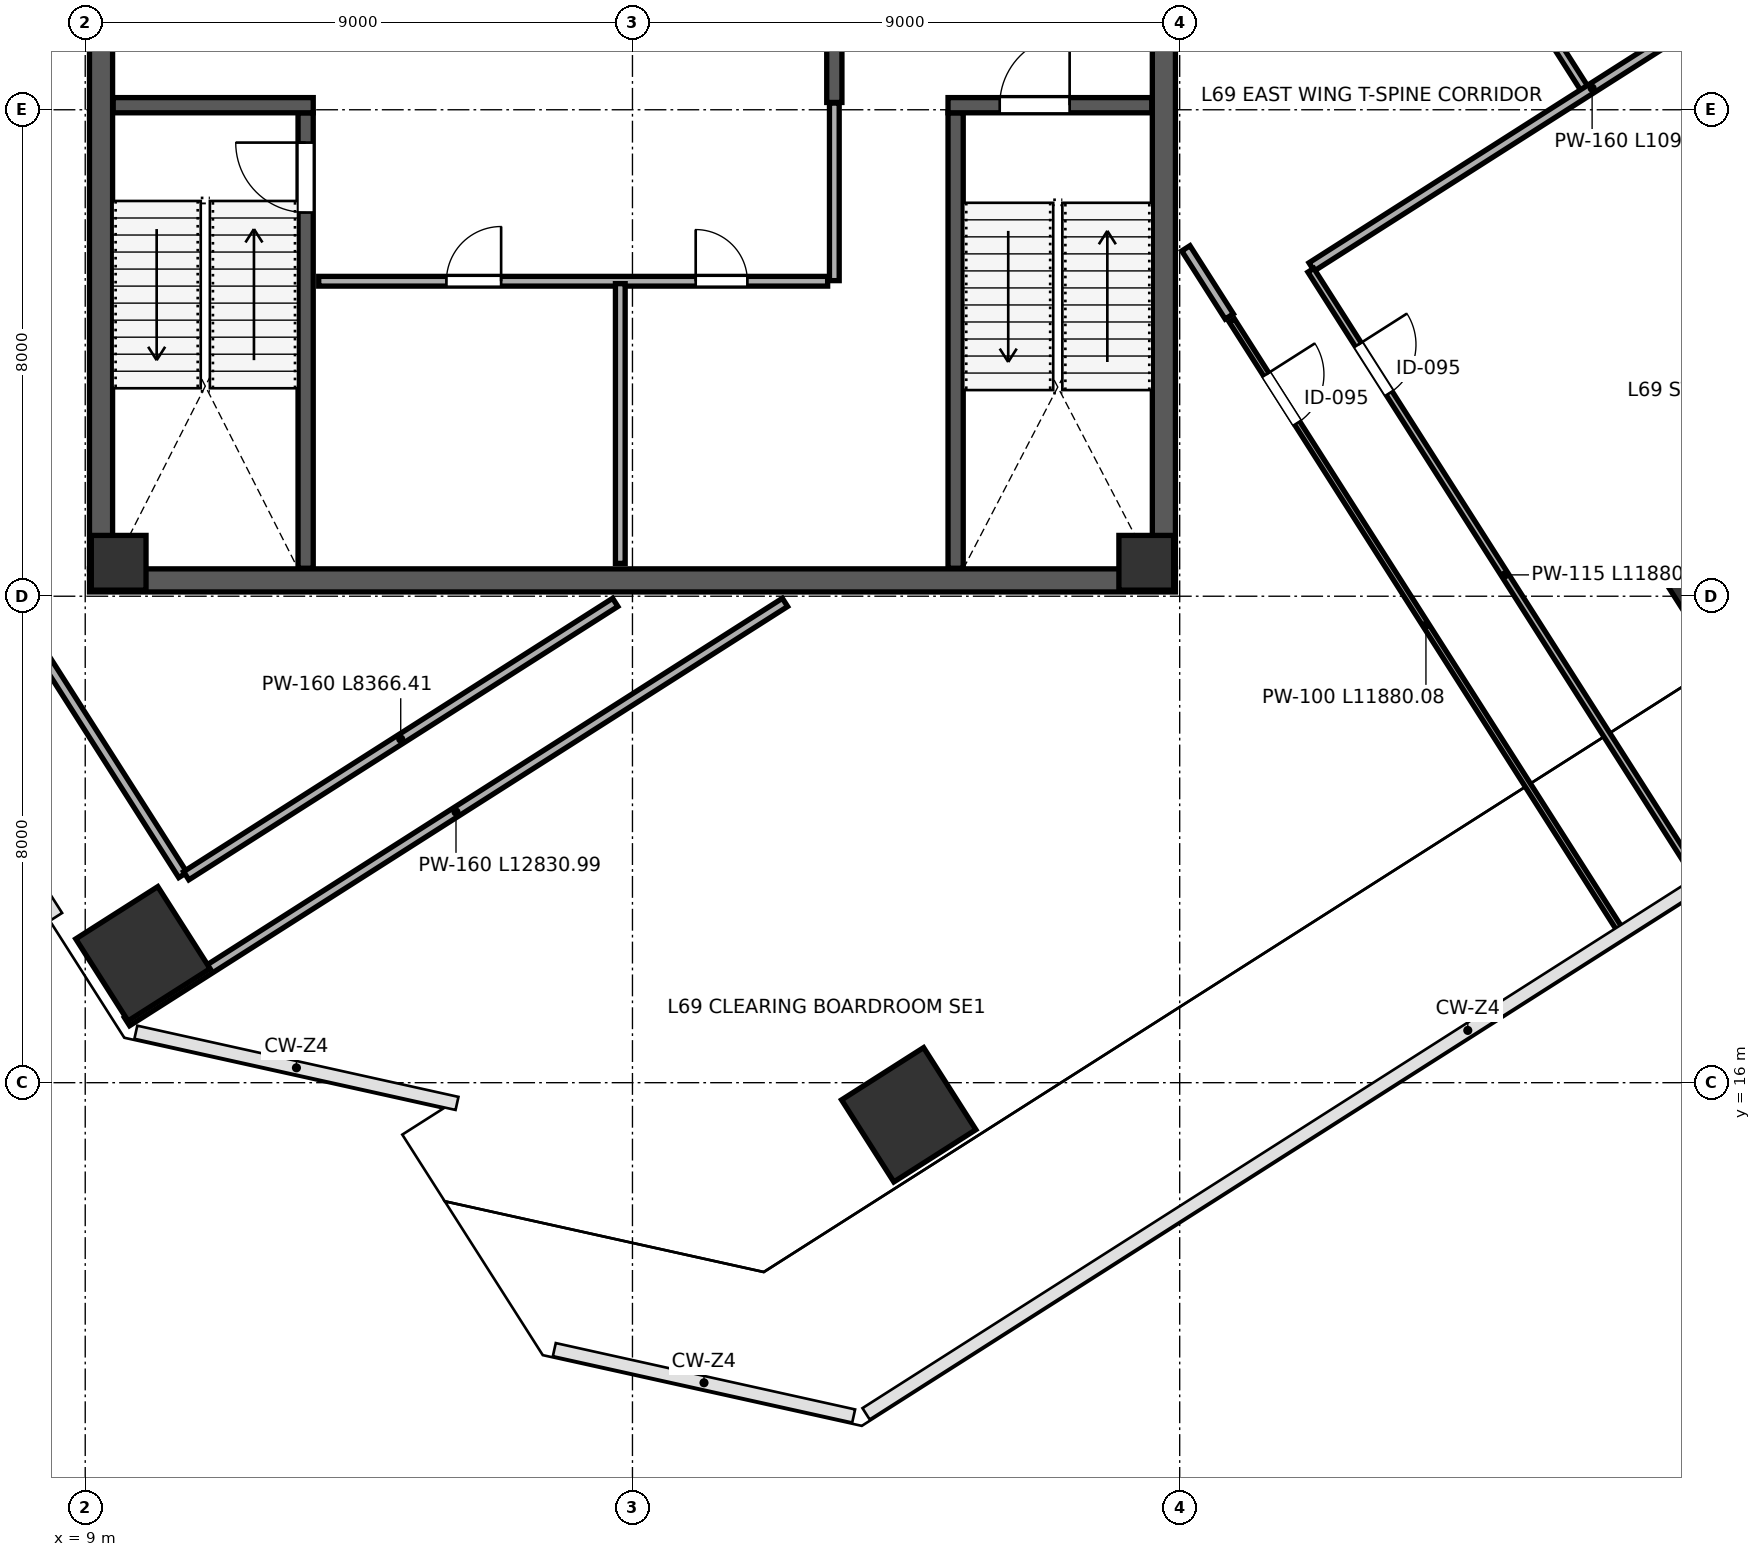
"""IFC4 building model, lengths in metres.
Left out: names, types, materials, properties, quantities, classifications, styles, units other than length and angle.
Written with IfcOpenShell. Run it as: python <this file> out.ifc"""

import sys

from ifc_helpers import new_model, si_unit, direction, frame, frame_2d, origin, origin_2d, place, context, subcontext, project, spatial, rectangle, extrude, source, transform, mapped, element, fill, save


model = new_model("IFC4")
c1 = context("Model", 3, precision=1e-05, world=origin(), true_north=direction((0.0, 1.0)))
c2 = subcontext(c1, "Body", "Model", "MODEL_VIEW")
j1 = project(units=[si_unit("LENGTHUNIT", "METRE"), si_unit("PLANEANGLEUNIT", "RADIAN")], contexts=[c1])
p1 = place(None, origin())
s1 = spatial("IfcSite", under=j1, at=p1, CompositionType="ELEMENT")
p2 = place(p1, origin())
s2 = spatial("IfcBuilding", under=s1, at=p2, CompositionType="ELEMENT")
p3 = place(p2, frame((0.0, 0.0, 307.2)))
s3 = spatial("IfcBuildingStorey", under=s2, at=p3, CompositionType="ELEMENT", Elevation=307.2)
m1 = source(origin(), c2, "Body", "SweptSolid", [
    extrude(rectangle(XDim=0.9, YDim=0.9, at=origin_2d()), origin(), (0.0, 0.0, 1.0), 4.198),
])
for number, where, z_axis, x_axis in (
    (1, (9.55, 24.55, 0.001), (0.0, 0.0, 1.0), (1.0, 0.0, 0.0)),
    (2, (26.45, 24.55, 0.001), (0.0, 0.0, 1.0), (1.0, 0.0, 0.0)),
):
    element("IfcColumn", number, at=place(p3, frame(where, z_axis=z_axis, x_axis=x_axis)), inside=s3, PredefinedType="COLUMN", context=c2, shape_type="MappedRepresentation", body=[
        mapped(m1, transform((0.0, 0.0, 0.0), scale=1.0)),
    ])
m2 = source(origin(), c2, "Body", "SweptSolid", [
    extrude(rectangle(XDim=1.6, YDim=1.6, at=origin_2d()), origin(), (0.0, 0.0, 1.0), 4.198),
])
for number, where, z_axis, x_axis in (
    (3, (9.949, 18.12, 0.001), (0.0, 0.0, 1.0), (-0.537, 0.843, 0.0)),
    (4, (22.544, 15.472, 0.001), (0.0, 0.0, 1.0), (-0.537, 0.843, 0.0)),
    (5, (36.038, 24.069, 0.001), (0.0, 0.0, 1.0), (-0.537, 0.843, 0.0)),
):
    element("IfcColumn", number, at=place(p3, frame(where, z_axis=z_axis, x_axis=x_axis)), inside=s3, PredefinedType="COLUMN", context=c2, shape_type="MappedRepresentation", body=[
        mapped(m2, transform((0.0, 0.0, 0.0), scale=1.0)),
    ])
p4 = place(p3, frame((9.26, 24.45, 0.0), z_axis=(0.0, 0.0, 1.0), x_axis=(0.0, 1.0, 0.0)))
e6 = element("IfcWall", 6, at=p4, inside=s3, PredefinedType="SHEAR", context=c2, shape_type="SweptSolid", body=[
    extrude(rectangle(XDim=15.1, YDim=0.38, at=frame_2d((7.55, 0.0))), origin(), (0.0, 0.0, 1.0), 3.96),
])
p5 = place(p4, frame((8.7, 0.0, 0.0)))
e7 = element("IfcOpeningElement", 7, at=p5, cuts=e6, PredefinedType="OPENING", context=c2, shape_type="SweptSolid", body=[
    extrude(rectangle(XDim=1.15, YDim=2.2, at=frame_2d((0.575, 1.1))), frame((0.0, 0.2, 0.0), z_axis=(0.0, -1.0, 0.0), x_axis=(1.0, 0.0, 0.0)), (0.0, 0.0, 1.0), 0.4),
])
p6 = place(p3, frame((26.74, 24.45, 0.0), z_axis=(0.0, 0.0, 1.0), x_axis=(0.0, 1.0, 0.0)))
e8 = element("IfcWall", 8, at=p6, inside=s3, PredefinedType="SHEAR", context=c2, shape_type="SweptSolid", body=[
    extrude(rectangle(XDim=15.1, YDim=0.38, at=frame_2d((7.55, 0.0))), origin(), (0.0, 0.0, 1.0), 3.96),
])
p7 = place(p6, frame((8.6, 0.0, 0.0)))
e9 = element("IfcOpeningElement", 9, at=p7, cuts=e8, PredefinedType="OPENING", context=c2, shape_type="SweptSolid", body=[
    extrude(rectangle(XDim=1.15, YDim=2.2, at=frame_2d((0.575, 1.1))), frame((0.0, 0.2, 0.0), z_axis=(0.0, -1.0, 0.0), x_axis=(1.0, 0.0, 0.0)), (0.0, 0.0, 1.0), 0.4),
])
p8 = place(p3, frame((9.07, 24.26, 0.0), z_axis=(0.0, 0.0, 1.0), x_axis=(1.0, 0.0, 0.0)))
e10 = element("IfcWall", 10, at=p8, inside=s3, PredefinedType="SHEAR", context=c2, shape_type="SweptSolid", body=[
    extrude(rectangle(XDim=17.86, YDim=0.38, at=frame_2d((8.93, 0.0))), origin(), (0.0, 0.0, 1.0), 3.96),
])
p9 = place(p3, frame((12.625, 24.46, 0.0), z_axis=(0.0, 0.0, 1.0), x_axis=(0.0, 1.0, 0.0)))
e11 = element("IfcWall", 11, at=p9, inside=s3, PredefinedType="SHEAR", context=c2, shape_type="SweptSolid", body=[
    extrude(rectangle(XDim=7.49, YDim=0.25, at=frame_2d((3.745, 0.0))), origin(), (0.0, 0.0, 1.0), 3.96),
])
p10 = place(p9, frame((5.85, 0.0, 0.0)))
e12 = element("IfcOpeningElement", 12, at=p10, cuts=e11, PredefinedType="OPENING", context=c2, shape_type="SweptSolid", body=[
    extrude(rectangle(XDim=1.15, YDim=2.2, at=frame_2d((0.575, 1.1))), frame((0.0, 0.135, 0.0), z_axis=(0.0, -1.0, 0.0), x_axis=(1.0, 0.0, 0.0)), (0.0, 0.0, 1.0), 0.27),
])
p11 = place(p3, frame((9.46, 32.075, 0.0), z_axis=(0.0, 0.0, 1.0), x_axis=(1.0, 0.0, 0.0)))
e13 = element("IfcWall", 13, at=p11, inside=s3, PredefinedType="SHEAR", context=c2, shape_type="SweptSolid", body=[
    extrude(rectangle(XDim=3.29, YDim=0.25, at=frame_2d((1.645, 0.0))), origin(), (0.0, 0.0, 1.0), 3.96),
])
p12 = place(p3, frame((23.315, 24.46, 0.0), z_axis=(0.0, 0.0, 1.0), x_axis=(0.0, 1.0, 0.0)))
e14 = element("IfcWall", 14, at=p12, inside=s3, PredefinedType="SHEAR", context=c2, shape_type="SweptSolid", body=[
    extrude(rectangle(XDim=7.49, YDim=0.25, at=frame_2d((3.745, 0.0))), origin(), (0.0, 0.0, 1.0), 3.96),
])
p13 = place(p3, frame((23.19, 32.075, 0.0), z_axis=(0.0, 0.0, 1.0), x_axis=(1.0, 0.0, 0.0)))
e15 = element("IfcWall", 15, at=p13, inside=s3, PredefinedType="SHEAR", context=c2, shape_type="SweptSolid", body=[
    extrude(rectangle(XDim=3.35, YDim=0.25, at=frame_2d((1.675, 0.0))), origin(), (0.0, 0.0, 1.0), 3.96),
])
p14 = place(p13, frame((0.85, 0.0, 0.0)))
e16 = element("IfcOpeningElement", 16, at=p14, cuts=e15, PredefinedType="OPENING", context=c2, shape_type="SweptSolid", body=[
    extrude(rectangle(XDim=1.15, YDim=2.2, at=frame_2d((0.575, 1.1))), frame((0.0, 0.135, 0.0), z_axis=(0.0, -1.0, 0.0), x_axis=(1.0, 0.0, 0.0)), (0.0, 0.0, 1.0), 0.27),
])
p15 = place(p3, frame((21.32, 32.12, 0.0), z_axis=(0.0, 0.0, 1.0), x_axis=(0.0, 1.0, 0.0)))
e17 = element("IfcWall", 17, at=p15, inside=s3, PredefinedType="SHEAR", context=c2, shape_type="SweptSolid", body=[
    extrude(rectangle(XDim=7.42, YDim=0.25, at=frame_2d((3.71, 0.0))), origin(), (0.0, 0.0, 1.0), 3.96),
])
p16 = place(p15, frame((1.4, 0.0, 0.0)))
e18 = element("IfcOpeningElement", 18, at=p16, cuts=e17, PredefinedType="OPENING", context=c2, shape_type="SweptSolid", body=[
    extrude(rectangle(XDim=1.15, YDim=2.2, at=frame_2d((0.575, 1.1))), frame((0.0, 0.135, 0.0), z_axis=(0.0, -1.0, 0.0), x_axis=(1.0, 0.0, 0.0)), (0.0, 0.0, 1.0), 0.27),
])
p17 = place(p3, frame((12.84, 29.18, 0.0), z_axis=(0.0, 0.0, 1.0), x_axis=(1.0, 0.0, 0.0)))
e19 = element("IfcWall", 19, at=p17, inside=s3, PredefinedType="PARTITIONING", context=c2, shape_type="SweptSolid", body=[
    extrude(rectangle(XDim=8.37, YDim=0.16, at=frame_2d((4.185, 0.0))), origin(), (0.0, 0.0, 1.0), 3.96),
])
p18 = place(p17, frame((2.1, 0.0, 0.0)))
e20 = element("IfcOpeningElement", 20, at=p18, cuts=e19, PredefinedType="OPENING", context=c2, shape_type="SweptSolid", body=[
    extrude(rectangle(XDim=0.9, YDim=2.15, at=frame_2d((0.45, 1.075))), frame((0.0, 0.09, 0.0), z_axis=(0.0, -1.0, 0.0), x_axis=(1.0, 0.0, 0.0)), (0.0, 0.0, 1.0), 0.18),
])
p19 = place(p17, frame((6.2, 0.0, 0.0)))
e21 = element("IfcOpeningElement", 21, at=p19, cuts=e19, PredefinedType="OPENING", context=c2, shape_type="SweptSolid", body=[
    extrude(rectangle(XDim=0.85, YDim=2.1, at=frame_2d((0.425, 1.05))), frame((0.0, 0.09, 0.0), z_axis=(0.0, -1.0, 0.0), x_axis=(1.0, 0.0, 0.0)), (0.0, 0.0, 1.0), 0.18),
])
p20 = place(p3, frame((17.8, 24.54, 0.0), z_axis=(0.0, 0.0, 1.0), x_axis=(0.0, 1.0, 0.0)))
e22 = element("IfcWall", 22, at=p20, inside=s3, PredefinedType="PARTITIONING", context=c2, shape_type="SweptSolid", body=[
    extrude(rectangle(XDim=4.6, YDim=0.16, at=frame_2d((2.3, 0.0))), origin(), (0.0, 0.0, 1.0), 3.96),
])
p21 = place(p3, frame((21.32, 29.19, 0.0), z_axis=(0.0, 0.0, 1.0), x_axis=(0.0, 1.0, 0.0)))
e23 = element("IfcWall", 23, at=p21, inside=s3, PredefinedType="PARTITIONING", context=c2, shape_type="SweptSolid", body=[
    extrude(rectangle(XDim=2.92, YDim=0.16, at=frame_2d((1.46, 0.0))), origin(), (0.0, 0.0, 1.0), 3.96),
])
p22 = place(p3, frame((3.26, 30.945, 0.0), z_axis=(0.0, 0.0, 1.0), x_axis=(0.537307625317, -0.843386338386, 0.0)))
e24 = element("IfcWall", 24, at=p22, inside=s3, PredefinedType="PARTITIONING", context=c2, shape_type="SweptSolid", body=[
    extrude(rectangle(XDim=13.67, YDim=0.16, at=frame_2d((6.835, 0.0))), origin(), (0.0, 0.0, 1.0), 3.96),
])
p23 = place(p22, frame((1.15, 0.0, 0.0)))
e25 = element("IfcOpeningElement", 25, at=p23, cuts=e24, PredefinedType="OPENING", context=c2, shape_type="SweptSolid", body=[
    extrude(rectangle(XDim=0.95, YDim=2.15, at=frame_2d((0.475, 1.075))), frame((0.0, 0.09, 0.0), z_axis=(0.0, -1.0, 0.0), x_axis=(1.0, 0.0, 0.0)), (0.0, 0.0, 1.0), 0.18),
])
p24 = place(p3, frame((10.661, 19.403, 0.0), z_axis=(0.0, 0.0, 1.0), x_axis=(0.843399441764, 0.537287057012, 0.0)))
e26 = element("IfcWall", 26, at=p24, inside=s3, PredefinedType="PARTITIONING", context=c2, shape_type="SweptSolid", body=[
    extrude(rectangle(XDim=8.366, YDim=0.16, at=frame_2d((4.183, 0.0))), origin(), (0.0, 0.0, 1.0), 3.96),
])
p25 = place(p3, frame((27.102, 29.721, 0.0), z_axis=(0.0, 0.0, 1.0), x_axis=(0.537279676557, -0.843404143432, 0.0)))
e27 = element("IfcWall", 27, at=p25, inside=s3, PredefinedType="PARTITIONING", context=c2, shape_type="SweptSolid", body=[
    extrude(rectangle(XDim=1.329, YDim=0.16, at=frame_2d((0.664, 0.0))), origin(), (0.0, 0.0, 1.0), 3.96),
])
p26 = place(p3, frame((22.509, 49.847, 0.0), z_axis=(0.0, 0.0, 1.0), x_axis=(0.537290700932, -0.843397120396, 0.0)))
e28 = element("IfcWall", 28, at=p26, inside=s3, PredefinedType="PARTITIONING", context=c2, shape_type="SweptSolid", body=[
    extrude(rectangle(XDim=20.77, YDim=0.135, at=frame_2d((10.385, 0.0))), origin(), (0.0, 0.0, 1.0), 3.96),
])
p27 = place(p26, frame((4.3, 0.0, 0.0)))
e29 = element("IfcOpeningElement", 29, at=p27, cuts=e28, PredefinedType="OPENING", context=c2, shape_type="SweptSolid", body=[
    extrude(rectangle(XDim=0.95, YDim=2.15, at=frame_2d((0.475, 1.075))), frame((0.0, 0.078, 0.0), z_axis=(0.0, -1.0, 0.0), x_axis=(1.0, 0.0, 0.0)), (0.0, 0.0, 1.0), 0.155),
])
p28 = place(p3, frame((29.169, 29.416, 0.0), z_axis=(0.0, 0.0, 1.0), x_axis=(0.843389386546, 0.537302840734, 0.0)))
e30 = element("IfcWall", 30, at=p28, inside=s3, PredefinedType="PARTITIONING", context=c2, shape_type="SweptSolid", body=[
    extrude(rectangle(XDim=10.94, YDim=0.16, at=frame_2d((5.47, 0.0))), origin(), (0.0, 0.0, 1.0), 3.96),
])
p29 = place(p3, frame((9.687, 17.004, 0.0), z_axis=(0.0, 0.0, 1.0), x_axis=(0.843392646996, 0.537297722862, 0.0)))
e31 = element("IfcWall", 31, at=p29, inside=s3, PredefinedType="PARTITIONING", context=c2, shape_type="SweptSolid", body=[
    extrude(rectangle(XDim=12.831, YDim=0.16, at=frame_2d((6.416, 0.0))), origin(), (0.0, 0.0, 1.0), 3.96),
])
p30 = place(p3, frame((29.157, 29.361, 0.0), z_axis=(0.0, 0.0, 1.0), x_axis=(0.537294294715, -0.843394830946, 0.0)))
e32 = element("IfcWall", 32, at=p30, inside=s3, PredefinedType="PARTITIONING", context=c2, shape_type="SweptSolid", body=[
    extrude(rectangle(XDim=11.88, YDim=0.115, at=frame_2d((5.94, 0.0))), origin(), (0.0, 0.0, 1.0), 3.252),
])
p31 = place(p30, frame((1.45, 0.0, 0.0)))
e33 = element("IfcOpeningElement", 33, at=p31, cuts=e32, PredefinedType="OPENING", context=c2, shape_type="SweptSolid", body=[
    extrude(rectangle(XDim=0.95, YDim=2.15, at=frame_2d((0.475, 1.075))), frame((0.0, 0.067, 0.0), z_axis=(0.0, -1.0, 0.0), x_axis=(1.0, 0.0, 0.0)), (0.0, 0.0, 1.0), 0.135),
])
p32 = place(p3, frame((27.858, 28.533, 0.0), z_axis=(0.0, 0.0, 1.0), x_axis=(0.537294294715, -0.843394830946, 0.0)))
e34 = element("IfcWall", 34, at=p32, inside=s3, PredefinedType="PARTITIONING", context=c2, shape_type="SweptSolid", body=[
    extrude(rectangle(XDim=11.88, YDim=0.1, at=frame_2d((5.94, 0.0))), origin(), (0.0, 0.0, 1.0), 3.252),
])
p33 = place(p32, frame((1.05, 0.0, 0.0)))
e35 = element("IfcOpeningElement", 35, at=p33, cuts=e34, PredefinedType="OPENING", context=c2, shape_type="SweptSolid", body=[
    extrude(rectangle(XDim=0.95, YDim=2.15, at=frame_2d((0.475, 1.075))), frame((0.0, 0.06, 0.0), z_axis=(0.0, -1.0, 0.0), x_axis=(1.0, 0.0, 0.0)), (0.0, 0.0, 1.0), 0.12),
])
m3 = source(origin(), c2, "Body", "SweptSolid", [
    extrude(rectangle(XDim=1.15, YDim=2.2, at=frame_2d((0.575, 1.1))), frame((0.0, 0.025, 0.0), z_axis=(0.0, -1.0, 0.0), x_axis=(1.0, 0.0, 0.0)), (0.0, 0.0, 1.0), 0.05),
])
p34 = place(p10, origin())
e36 = element("IfcDoor", 36, at=p34, inside=s3, OperationType="SINGLE_SWING_RIGHT", PredefinedType="DOOR", context=c2, shape_type="MappedRepresentation", body=[
    mapped(m3, transform((0.0, 0.0, 0.0), scale=1.0)),
])
fill(e12, e36)
p35 = place(p14, origin())
e37 = element("IfcDoor", 37, at=p35, inside=s3, OperationType="SINGLE_SWING_RIGHT", PredefinedType="DOOR", context=c2, shape_type="MappedRepresentation", body=[
    mapped(m3, transform((0.0, 0.0, 0.0), scale=1.0)),
])
fill(e16, e37)
m4 = source(origin(), c2, "Body", "SweptSolid", [
    extrude(rectangle(XDim=0.9, YDim=2.15, at=frame_2d((0.45, 1.075))), frame((0.0, 0.025, 0.0), z_axis=(0.0, -1.0, 0.0), x_axis=(1.0, 0.0, 0.0)), (0.0, 0.0, 1.0), 0.05),
])
p36 = place(p18, origin())
e38 = element("IfcDoor", 38, at=p36, inside=s3, OperationType="SINGLE_SWING_RIGHT", PredefinedType="DOOR", context=c2, shape_type="MappedRepresentation", body=[
    mapped(m4, transform((0.0, 0.0, 0.0), scale=1.0)),
])
fill(e20, e38)
m5 = source(origin(), c2, "Body", "SweptSolid", [
    extrude(rectangle(XDim=0.85, YDim=2.1, at=frame_2d((0.425, 1.05))), frame((0.0, 0.025, 0.0), z_axis=(0.0, -1.0, 0.0), x_axis=(1.0, 0.0, 0.0)), (0.0, 0.0, 1.0), 0.05),
])
p37 = place(p19, origin())
e39 = element("IfcDoor", 39, at=p37, inside=s3, OperationType="SINGLE_SWING_LEFT", PredefinedType="DOOR", context=c2, shape_type="MappedRepresentation", body=[
    mapped(m5, transform((0.0, 0.0, 0.0), scale=1.0)),
])
fill(e21, e39)
m6 = source(origin(), c2, "Body", "SweptSolid", [
    extrude(rectangle(XDim=0.95, YDim=2.15, at=frame_2d((0.475, 1.075))), frame((0.0, 0.025, 0.0), z_axis=(0.0, -1.0, 0.0), x_axis=(1.0, 0.0, 0.0)), (0.0, 0.0, 1.0), 0.05),
])
p38 = place(p31, origin())
e40 = element("IfcDoor", 40, at=p38, inside=s3, OperationType="SINGLE_SWING_LEFT", PredefinedType="DOOR", context=c2, shape_type="MappedRepresentation", body=[
    mapped(m6, transform((0.0, 0.0, 0.0), scale=1.0)),
])
fill(e33, e40)
p39 = place(p33, origin())
e41 = element("IfcDoor", 41, at=p39, inside=s3, OperationType="SINGLE_SWING_LEFT", PredefinedType="DOOR", context=c2, shape_type="MappedRepresentation", body=[
    mapped(m6, transform((0.0, 0.0, 0.0), scale=1.0)),
])
fill(e35, e41)
save(model, sys.argv[1])
